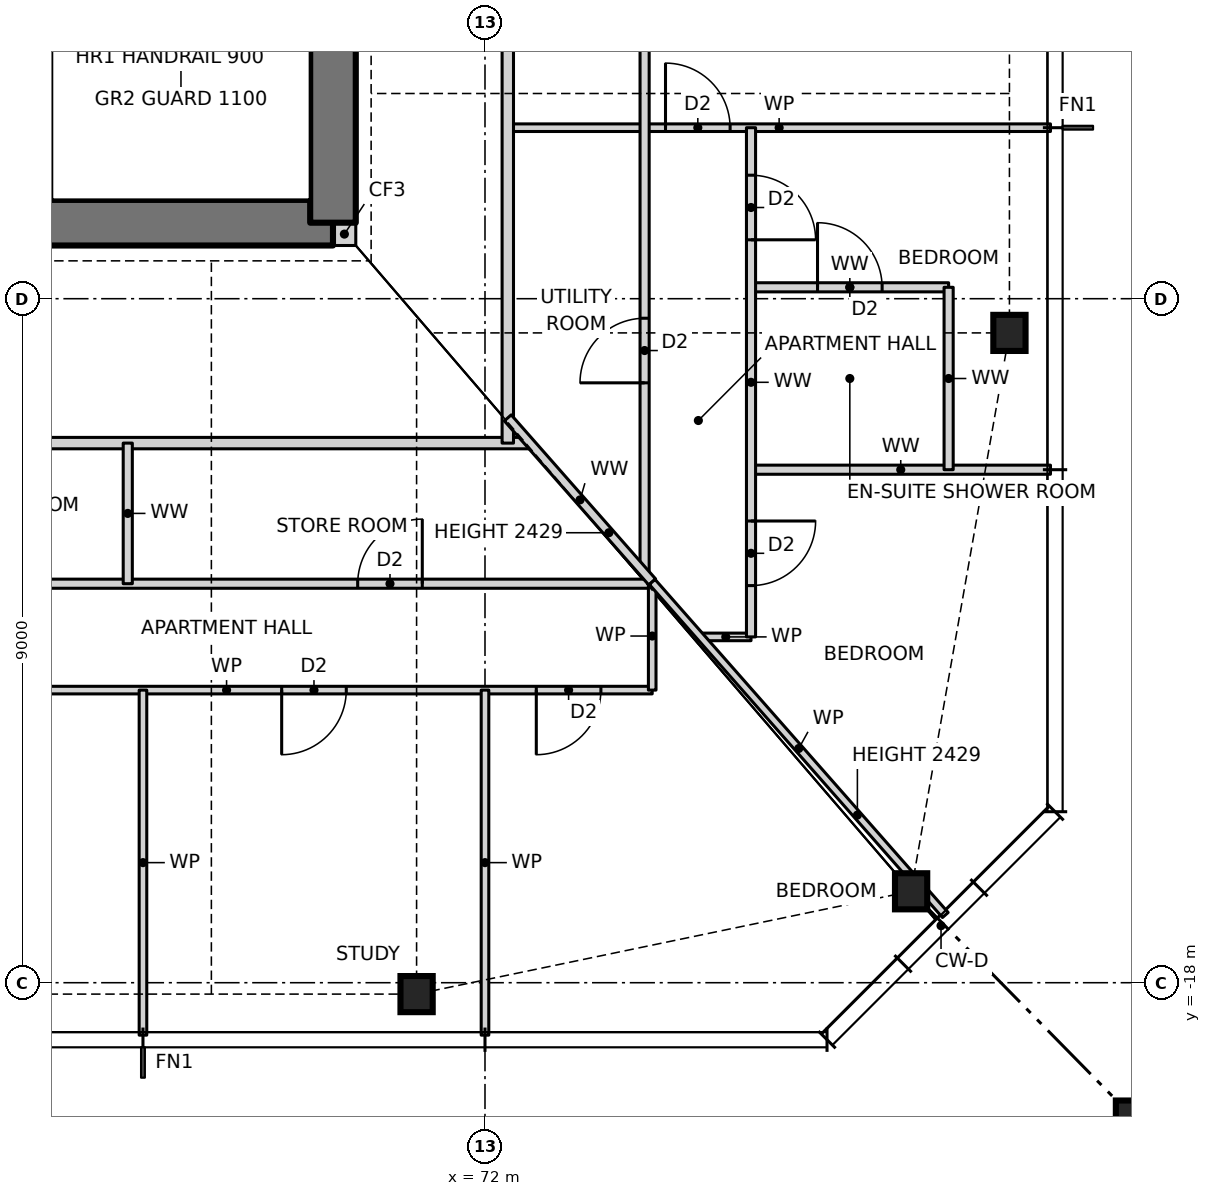
"""IFC4 building model, lengths in metres.
Left out: names, types, materials, properties, quantities, classifications, styles, units other than length and angle.
Written with IfcOpenShell. Run it as: python <this file> out.ifc"""

import sys

from ifc_helpers import new_model, si_unit, direction, frame, frame_2d, origin, origin_2d, place, context, subcontext, project, spatial, rectangle, hollow_rectangle, i_section, extrude, element, fill, save


model = new_model("IFC4")
c1 = context("Model", 3, precision=1e-05, world=origin(), true_north=direction((0.0, 1.0)))
c2 = subcontext(c1, "Body", "Model", "MODEL_VIEW")
j1 = project(units=[si_unit("LENGTHUNIT", "METRE"), si_unit("PLANEANGLEUNIT", "RADIAN")], contexts=[c1])
p1 = place(None, origin())
s1 = spatial("IfcSite", under=j1, at=p1, CompositionType="ELEMENT")
p2 = place(p1, origin())
s2 = spatial("IfcBuilding", under=s1, at=p2, CompositionType="ELEMENT")
p3 = place(p2, frame((0.0, 0.0, 18.5)))
s3 = spatial("IfcBuildingStorey", under=s2, at=p3, CompositionType="ELEMENT", Elevation=18.5)
for number, where, z_axis, x_axis in (
    (1, (71.1, -18.15, 0.0), (0.0, 0.0, 1.0), (1.0, 0.0, 0.0)),
    (2, (77.606, -16.797, 0.0), (0.0, 0.0, 1.0), (1.0, 0.0, 0.0)),
    (3, (78.9, -9.45, 0.0), (0.0, 0.0, 1.0), (1.0, 0.0, 0.0)),
):
    element("IfcColumn", number, at=place(p3, frame(where, z_axis=z_axis, x_axis=x_axis)), inside=s3, PredefinedType="COLUMN", context=c2, shape_type="SweptSolid", body=[
        extrude(i_section(OverallWidth=0.424, OverallDepth=0.475, WebThickness=0.048, FlangeThickness=0.077, at=origin_2d()), origin(), (0.0, 0.0, 1.0), 3.5),
    ])
p4 = place(p3, frame((80.9, -20.15, 0.0), z_axis=(0.0, 0.0, 1.0), x_axis=(1.0, 0.0, 0.0)))
e4 = element("IfcColumn", 4, at=p4, inside=s3, PredefinedType="COLUMN", context=c2, shape_type="SweptSolid", body=[
    extrude(hollow_rectangle(XDim=1.2, YDim=1.2, WallThickness=0.07, at=origin_2d()), origin(), (0.0, 0.0, 1.0), 3.5),
])
p5 = place(p3, frame((70.0, -8.15, 0.0), z_axis=(0.0, 0.0, 1.0), x_axis=(1.0, 0.0, 0.0)))
e5 = element("IfcWall", 5, at=p5, inside=s3, PredefinedType="SOLIDWALL", context=c2, shape_type="SweptSolid", body=[
    extrude(rectangle(XDim=0.3, YDim=0.3, at=frame_2d((0.15, 0.0))), origin(), (0.0, 0.0, 1.0), 3.5),
])
p6 = place(p3, frame((56.0, -8.0, 0.0), z_axis=(0.0, 0.0, 1.0), x_axis=(1.0, 0.0, 0.0)))
e6 = element("IfcWall", 6, at=p6, inside=s3, PredefinedType="SHEAR", context=c2, shape_type="SweptSolid", body=[
    extrude(rectangle(XDim=14.0, YDim=0.6, at=frame_2d((7.0, 0.0))), origin(), (0.0, 0.0, 1.0), 3.5),
])
p7 = place(p6, frame((2.7, 0.0, 0.0)))
e7 = element("IfcOpeningElement", 7, at=p7, cuts=e6, PredefinedType="OPENING", context=c2, shape_type="SweptSolid", body=[
    extrude(rectangle(XDim=0.9, YDim=2.1, at=frame_2d((0.45, 1.05))), frame((0.0, 0.31, 0.0), z_axis=(0.0, -1.0, 0.0), x_axis=(1.0, 0.0, 0.0)), (0.0, 0.0, 1.0), 0.62),
])
p8 = place(p6, frame((7.7, 0.0, 0.0)))
e8 = element("IfcOpeningElement", 8, at=p8, cuts=e6, PredefinedType="OPENING", context=c2, shape_type="SweptSolid", body=[
    extrude(rectangle(XDim=0.9, YDim=2.1, at=frame_2d((0.45, 1.05))), frame((0.0, 0.31, 0.0), z_axis=(0.0, -1.0, 0.0), x_axis=(1.0, 0.0, 0.0)), (0.0, 0.0, 1.0), 0.62),
])
p9 = place(p3, frame((70.0, -8.0, 0.0), z_axis=(0.0, 0.0, 1.0), x_axis=(0.0, 1.0, 0.0)))
e9 = element("IfcWall", 9, at=p9, inside=s3, PredefinedType="SHEAR", context=c2, shape_type="SweptSolid", body=[
    extrude(rectangle(XDim=16.0, YDim=0.6, at=frame_2d((8.0, 0.0))), origin(), (0.0, 0.0, 1.0), 3.5),
])
p10 = place(p9, frame((7.5, 0.0, 0.0)))
e10 = element("IfcOpeningElement", 10, at=p10, cuts=e9, PredefinedType="OPENING", context=c2, shape_type="SweptSolid", body=[
    extrude(rectangle(XDim=1.0, YDim=2.1, at=frame_2d((0.5, 1.05))), frame((0.0, 0.31, 0.0), z_axis=(0.0, -1.0, 0.0), x_axis=(1.0, 0.0, 0.0)), (0.0, 0.0, 1.0), 0.62),
])
p11 = place(p3, frame((63.0, -14.15, 0.0), z_axis=(0.0, 0.0, 1.0), x_axis=(1.0, 0.0, 0.0)))
e11 = element("IfcWall", 11, at=p11, inside=s3, PredefinedType="PARTITIONING", context=c2, shape_type="SweptSolid", body=[
    extrude(rectangle(XDim=11.2, YDim=0.1, at=frame_2d((5.6, 0.0))), origin(), (0.0, 0.0, 1.0), 3.27),
])
p12 = place(p11, frame((1.825, 0.0, 0.0)))
e12 = element("IfcOpeningElement", 12, at=p12, cuts=e11, PredefinedType="OPENING", context=c2, shape_type="SweptSolid", body=[
    extrude(rectangle(XDim=0.85, YDim=2.1, at=frame_2d((0.425, 1.05))), frame((0.0, 0.06, 0.0), z_axis=(0.0, -1.0, 0.0), x_axis=(1.0, 0.0, 0.0)), (0.0, 0.0, 1.0), 0.12),
])
p13 = place(p11, frame((6.325, 0.0, 0.0)))
e13 = element("IfcOpeningElement", 13, at=p13, cuts=e11, PredefinedType="OPENING", context=c2, shape_type="SweptSolid", body=[
    extrude(rectangle(XDim=0.85, YDim=2.1, at=frame_2d((0.425, 1.05))), frame((0.0, 0.06, 0.0), z_axis=(0.0, -1.0, 0.0), x_axis=(1.0, 0.0, 0.0)), (0.0, 0.0, 1.0), 0.12),
])
p14 = place(p11, frame((9.675, 0.0, 0.0)))
e14 = element("IfcOpeningElement", 14, at=p14, cuts=e11, PredefinedType="OPENING", context=c2, shape_type="SweptSolid", body=[
    extrude(rectangle(XDim=0.85, YDim=2.1, at=frame_2d((0.425, 1.05))), frame((0.0, 0.06, 0.0), z_axis=(0.0, -1.0, 0.0), x_axis=(1.0, 0.0, 0.0)), (0.0, 0.0, 1.0), 0.12),
])
p15 = place(p3, frame((74.836, -13.45, 0.0), z_axis=(0.0, 0.0, 1.0), x_axis=(1.0, 0.0, 0.0)))
e15 = element("IfcWall", 15, at=p15, inside=s3, PredefinedType="PARTITIONING", context=c2, shape_type="SweptSolid", body=[
    extrude(rectangle(XDim=0.664, YDim=0.1, at=frame_2d((0.332, 0.0))), origin(), (0.0, 0.0, 1.0), 3.27),
])
p16 = place(p3, frame((54.0, -12.75, 0.0), z_axis=(0.0, 0.0, 1.0), x_axis=(1.0, 0.0, 0.0)))
e16 = element("IfcWall", 16, at=p16, inside=s3, PredefinedType="PARTITIONING", context=c2, shape_type="SweptSolid", body=[
    extrude(rectangle(XDim=20.2, YDim=0.12, at=frame_2d((10.1, 0.0))), origin(), (0.0, 0.0, 1.0), 3.27),
])
p17 = place(p16, frame((1.375, 0.0, 0.0)))
e17 = element("IfcOpeningElement", 17, at=p17, cuts=e16, PredefinedType="OPENING", context=c2, shape_type="SweptSolid", body=[
    extrude(rectangle(XDim=0.85, YDim=2.1, at=frame_2d((0.425, 1.05))), frame((0.0, 0.07, 0.0), z_axis=(0.0, -1.0, 0.0), x_axis=(1.0, 0.0, 0.0)), (0.0, 0.0, 1.0), 0.14),
])
p18 = place(p16, frame((4.575, 0.0, 0.0)))
e18 = element("IfcOpeningElement", 18, at=p18, cuts=e16, PredefinedType="OPENING", context=c2, shape_type="SweptSolid", body=[
    extrude(rectangle(XDim=0.85, YDim=2.1, at=frame_2d((0.425, 1.05))), frame((0.0, 0.07, 0.0), z_axis=(0.0, -1.0, 0.0), x_axis=(1.0, 0.0, 0.0)), (0.0, 0.0, 1.0), 0.14),
])
p19 = place(p16, frame((10.725, 0.0, 0.0)))
e19 = element("IfcOpeningElement", 19, at=p19, cuts=e16, PredefinedType="OPENING", context=c2, shape_type="SweptSolid", body=[
    extrude(rectangle(XDim=0.85, YDim=2.1, at=frame_2d((0.425, 1.05))), frame((0.0, 0.07, 0.0), z_axis=(0.0, -1.0, 0.0), x_axis=(1.0, 0.0, 0.0)), (0.0, 0.0, 1.0), 0.14),
])
p20 = place(p16, frame((16.325, 0.0, 0.0)))
e20 = element("IfcOpeningElement", 20, at=p20, cuts=e16, PredefinedType="OPENING", context=c2, shape_type="SweptSolid", body=[
    extrude(rectangle(XDim=0.85, YDim=2.1, at=frame_2d((0.425, 1.05))), frame((0.0, 0.07, 0.0), z_axis=(0.0, -1.0, 0.0), x_axis=(1.0, 0.0, 0.0)), (0.0, 0.0, 1.0), 0.14),
])
p21 = place(p3, frame((75.5, -11.25, 0.0), z_axis=(0.0, 0.0, 1.0), x_axis=(1.0, 0.0, 0.0)))
e21 = element("IfcWall", 21, at=p21, inside=s3, PredefinedType="PARTITIONING", context=c2, shape_type="SweptSolid", body=[
    extrude(rectangle(XDim=3.94, YDim=0.12, at=frame_2d((1.97, 0.0))), origin(), (0.0, 0.0, 1.0), 3.27),
])
p22 = place(p3, frame((53.408, -10.9, 0.0), z_axis=(0.0, 0.0, 1.0), x_axis=(1.0, 0.0, 0.0)))
e22 = element("IfcWall", 22, at=p22, inside=s3, PredefinedType="PARTITIONING", context=c2, shape_type="SweptSolid", body=[
    extrude(rectangle(XDim=19.184, YDim=0.15, at=frame_2d((9.592, 0.0))), origin(), (0.0, 0.0, 1.0), 3.27),
])
p23 = place(p22, frame((5.092, 0.0, 0.0)))
e23 = element("IfcOpeningElement", 23, at=p23, cuts=e22, PredefinedType="OPENING", context=c2, shape_type="SweptSolid", body=[
    extrude(rectangle(XDim=1.0, YDim=2.1, at=frame_2d((0.5, 1.05))), frame((0.0, 0.085, 0.0), z_axis=(0.0, -1.0, 0.0), x_axis=(1.0, 0.0, 0.0)), (0.0, 0.0, 1.0), 0.17),
])
p24 = place(p3, frame((75.5, -8.85, 0.0), z_axis=(0.0, 0.0, 1.0), x_axis=(1.0, 0.0, 0.0)))
e24 = element("IfcWall", 24, at=p24, inside=s3, PredefinedType="PARTITIONING", context=c2, shape_type="SweptSolid", body=[
    extrude(rectangle(XDim=2.6, YDim=0.12, at=frame_2d((1.3, 0.0))), origin(), (0.0, 0.0, 1.0), 3.27),
])
p25 = place(p24, frame((0.875, 0.0, 0.0)))
e25 = element("IfcOpeningElement", 25, at=p25, cuts=e24, PredefinedType="OPENING", context=c2, shape_type="SweptSolid", body=[
    extrude(rectangle(XDim=0.85, YDim=2.1, at=frame_2d((0.425, 1.05))), frame((0.0, 0.07, 0.0), z_axis=(0.0, -1.0, 0.0), x_axis=(1.0, 0.0, 0.0)), (0.0, 0.0, 1.0), 0.14),
])
p26 = place(p3, frame((72.3, -6.75, 0.0), z_axis=(0.0, 0.0, 1.0), x_axis=(1.0, 0.0, 0.0)))
e26 = element("IfcWall", 26, at=p26, inside=s3, PredefinedType="PARTITIONING", context=c2, shape_type="SweptSolid", body=[
    extrude(rectangle(XDim=7.14, YDim=0.1, at=frame_2d((3.57, 0.0))), origin(), (0.0, 0.0, 1.0), 3.27),
])
p27 = place(p26, frame((2.075, 0.0, 0.0)))
e27 = element("IfcOpeningElement", 27, at=p27, cuts=e26, PredefinedType="OPENING", context=c2, shape_type="SweptSolid", body=[
    extrude(rectangle(XDim=0.85, YDim=2.1, at=frame_2d((0.425, 1.05))), frame((0.0, 0.06, 0.0), z_axis=(0.0, -1.0, 0.0), x_axis=(1.0, 0.0, 0.0)), (0.0, 0.0, 1.0), 0.12),
])
p28 = place(p3, frame((78.1, -11.25, 0.0), z_axis=(0.0, 0.0, 1.0), x_axis=(0.0, 1.0, 0.0)))
e28 = element("IfcWall", 28, at=p28, inside=s3, PredefinedType="PARTITIONING", context=c2, shape_type="SweptSolid", body=[
    extrude(rectangle(XDim=2.4, YDim=0.12, at=frame_2d((1.2, 0.0))), origin(), (0.0, 0.0, 1.0), 3.27),
])
p29 = place(p3, frame((75.5, -13.45, 0.0), z_axis=(0.0, 0.0, 1.0), x_axis=(0.0, 1.0, 0.0)))
e29 = element("IfcWall", 29, at=p29, inside=s3, PredefinedType="PARTITIONING", context=c2, shape_type="SweptSolid", body=[
    extrude(rectangle(XDim=6.7, YDim=0.12, at=frame_2d((3.35, 0.0))), origin(), (0.0, 0.0, 1.0), 3.27),
])
p30 = place(p29, frame((5.225, 0.0, 0.0)))
e30 = element("IfcOpeningElement", 30, at=p30, cuts=e29, PredefinedType="OPENING", context=c2, shape_type="SweptSolid", body=[
    extrude(rectangle(XDim=0.85, YDim=2.1, at=frame_2d((0.425, 1.05))), frame((0.0, 0.07, 0.0), z_axis=(0.0, -1.0, 0.0), x_axis=(1.0, 0.0, 0.0)), (0.0, 0.0, 1.0), 0.14),
])
p31 = place(p29, frame((0.675, 0.0, 0.0)))
e31 = element("IfcOpeningElement", 31, at=p31, cuts=e29, PredefinedType="OPENING", context=c2, shape_type="SweptSolid", body=[
    extrude(rectangle(XDim=0.85, YDim=2.1, at=frame_2d((0.425, 1.05))), frame((0.0, 0.07, 0.0), z_axis=(0.0, -1.0, 0.0), x_axis=(1.0, 0.0, 0.0)), (0.0, 0.0, 1.0), 0.14),
])
p32 = place(p3, frame((74.2, -14.15, 0.0), z_axis=(0.0, 0.0, 1.0), x_axis=(0.0, 1.0, 0.0)))
e32 = element("IfcWall", 32, at=p32, inside=s3, PredefinedType="PARTITIONING", context=c2, shape_type="SweptSolid", body=[
    extrude(rectangle(XDim=1.423, YDim=0.1, at=frame_2d((0.711, 0.0))), origin(), (0.0, 0.0, 1.0), 3.27),
])
p33 = place(p3, frame((74.1, -12.614, 0.0), z_axis=(0.0, 0.0, 1.0), x_axis=(0.0, 1.0, 0.0)))
e33 = element("IfcWall", 33, at=p33, inside=s3, PredefinedType="PARTITIONING", context=c2, shape_type="SweptSolid", body=[
    extrude(rectangle(XDim=25.228, YDim=0.12, at=frame_2d((12.614, 0.0))), origin(), (0.0, 0.0, 1.0), 3.27),
])
p34 = place(p33, frame((7.239, 0.0, 0.0)))
e34 = element("IfcOpeningElement", 34, at=p34, cuts=e33, PredefinedType="OPENING", context=c2, shape_type="SweptSolid", body=[
    extrude(rectangle(XDim=0.85, YDim=2.1, at=frame_2d((0.425, 1.05))), frame((0.0, 0.07, 0.0), z_axis=(0.0, -1.0, 0.0), x_axis=(1.0, 0.0, 0.0)), (0.0, 0.0, 1.0), 0.14),
])
p35 = place(p33, frame((10.439, 0.0, 0.0)))
e35 = element("IfcOpeningElement", 35, at=p35, cuts=e33, PredefinedType="OPENING", context=c2, shape_type="SweptSolid", body=[
    extrude(rectangle(XDim=0.85, YDim=2.1, at=frame_2d((0.425, 1.05))), frame((0.0, 0.07, 0.0), z_axis=(0.0, -1.0, 0.0), x_axis=(1.0, 0.0, 0.0)), (0.0, 0.0, 1.0), 0.14),
])
p36 = place(p33, frame((2.507, 0.0, 0.0)))
e36 = element("IfcOpeningElement", 36, at=p36, cuts=e33, PredefinedType="OPENING", context=c2, shape_type="SweptSolid", body=[
    extrude(rectangle(XDim=0.85, YDim=2.1, at=frame_2d((0.425, 1.05))), frame((0.0, 0.07, 0.0), z_axis=(0.0, -1.0, 0.0), x_axis=(1.0, 0.0, 0.0)), (0.0, 0.0, 1.0), 0.14),
])
p37 = place(p33, frame((16.639, 0.0, 0.0)))
e37 = element("IfcOpeningElement", 37, at=p37, cuts=e33, PredefinedType="OPENING", context=c2, shape_type="SweptSolid", body=[
    extrude(rectangle(XDim=0.85, YDim=2.1, at=frame_2d((0.425, 1.05))), frame((0.0, 0.07, 0.0), z_axis=(0.0, -1.0, 0.0), x_axis=(1.0, 0.0, 0.0)), (0.0, 0.0, 1.0), 0.14),
])
p38 = place(p33, frame((21.821, 0.0, 0.0)))
e38 = element("IfcOpeningElement", 38, at=p38, cuts=e33, PredefinedType="OPENING", context=c2, shape_type="SweptSolid", body=[
    extrude(rectangle(XDim=0.85, YDim=2.1, at=frame_2d((0.425, 1.05))), frame((0.0, 0.07, 0.0), z_axis=(0.0, -1.0, 0.0), x_axis=(1.0, 0.0, 0.0)), (0.0, 0.0, 1.0), 0.14),
])
p39 = place(p3, frame((72.3, -10.9, 0.0), z_axis=(0.0, 0.0, 1.0), x_axis=(0.0, 1.0, 0.0)))
e39 = element("IfcWall", 39, at=p39, inside=s3, PredefinedType="PARTITIONING", context=c2, shape_type="SweptSolid", body=[
    extrude(rectangle(XDim=21.468, YDim=0.15, at=frame_2d((10.734, 0.0))), origin(), (0.0, 0.0, 1.0), 3.27),
])
p40 = place(p39, frame((8.65, 0.0, 0.0)))
e40 = element("IfcOpeningElement", 40, at=p40, cuts=e39, PredefinedType="OPENING", context=c2, shape_type="SweptSolid", body=[
    extrude(rectangle(XDim=1.0, YDim=2.1, at=frame_2d((0.5, 1.05))), frame((0.0, 0.085, 0.0), z_axis=(0.0, -1.0, 0.0), x_axis=(1.0, 0.0, 0.0)), (0.0, 0.0, 1.0), 0.17),
])
for number, where, z_axis, x_axis in (
    (41, (72.0, -18.69, 0.0), (0.0, 0.0, 1.0), (0.0, 1.0, 0.0)),
    (42, (67.5, -18.69, 0.0), (0.0, 0.0, 1.0), (0.0, 1.0, 0.0)),
):
    element("IfcWall", number, at=place(p3, frame(where, z_axis=z_axis, x_axis=x_axis)), inside=s3, PredefinedType="PARTITIONING", context=c2, shape_type="SweptSolid", body=[
        extrude(rectangle(XDim=4.54, YDim=0.1, at=frame_2d((2.27, 0.0))), origin(), (0.0, 0.0, 1.0), 3.27),
    ])
p41 = place(p3, frame((67.3, -12.75, 0.0), z_axis=(0.0, 0.0, 1.0), x_axis=(0.0, 1.0, 0.0)))
e43 = element("IfcWall", 43, at=p41, inside=s3, PredefinedType="PARTITIONING", context=c2, shape_type="SweptSolid", body=[
    extrude(rectangle(XDim=1.85, YDim=0.12, at=frame_2d((0.925, 0.0))), origin(), (0.0, 0.0, 1.0), 3.27),
])
p42 = place(p3, frame((66.3, -7.64, 0.0), z_axis=(0.0, 0.0, 1.0), x_axis=(0.0, 1.0, 0.0)))
e44 = element("IfcWall", 44, at=p42, inside=s3, PredefinedType="SOLIDWALL", context=c2, shape_type="SweptSolid", body=[
    extrude(rectangle(XDim=11.49, YDim=0.2, at=frame_2d((5.745, 0.0))), origin(), (0.0, 0.0, 1.0), 3.5),
])
p43 = place(p42, frame((7.04, 0.0, 0.0)))
e45 = element("IfcOpeningElement", 45, at=p43, cuts=e44, PredefinedType="OPENING", context=c2, shape_type="SweptSolid", body=[
    extrude(rectangle(XDim=1.2, YDim=2.1, at=frame_2d((0.6, 1.05))), frame((0.0, 0.11, 0.0), z_axis=(0.0, -1.0, 0.0), x_axis=(1.0, 0.0, 0.0)), (0.0, 0.0, 1.0), 0.22),
])
p44 = place(p3, frame((74.2, -12.727, 0.0), z_axis=(0.0, 0.0, 1.0), x_axis=(-0.66059344937, 0.75074382758, 0.0)))
e46 = element("IfcWall", 46, at=p44, inside=s3, PredefinedType="PARTITIONING", context=c2, shape_type="SweptSolid", body=[
    extrude(rectangle(XDim=2.876, YDim=0.12, at=frame_2d((1.438, 0.0))), origin(), (0.0, 0.0, 1.0), 2.429),
])
p45 = place(p3, frame((78.057, -17.109, 0.0), z_axis=(0.0, 0.0, 1.0), x_axis=(-0.660654290516, 0.750690287951, 0.0)))
e47 = element("IfcWall", 47, at=p45, inside=s3, PredefinedType="PARTITIONING", context=c2, shape_type="SweptSolid", body=[
    extrude(rectangle(XDim=5.838, YDim=0.1, at=frame_2d((2.919, 0.0))), origin(), (0.0, 0.0, 1.0), 2.429),
])
p46 = place(p13, frame((0.85, 0.0, 0.0), z_axis=(0.0, 0.0, 1.0), x_axis=(-1.0, 0.0, 0.0)))
e48 = element("IfcDoor", 48, at=p46, inside=s3, OperationType="SINGLE_SWING_RIGHT", PredefinedType="DOOR", context=c2, shape_type="SweptSolid", body=[
    extrude(rectangle(XDim=0.85, YDim=2.1, at=frame_2d((0.425, 1.05))), frame((0.0, 0.025, 0.0), z_axis=(0.0, -1.0, 0.0), x_axis=(1.0, 0.0, 0.0)), (0.0, 0.0, 1.0), 0.05),
])
fill(e13, e48)
p47 = place(p14, frame((0.85, 0.0, 0.0), z_axis=(0.0, 0.0, 1.0), x_axis=(-1.0, 0.0, 0.0)))
e49 = element("IfcDoor", 49, at=p47, inside=s3, OperationType="SINGLE_SWING_RIGHT", PredefinedType="DOOR", context=c2, shape_type="SweptSolid", body=[
    extrude(rectangle(XDim=0.85, YDim=2.1, at=frame_2d((0.425, 1.05))), frame((0.0, 0.025, 0.0), z_axis=(0.0, -1.0, 0.0), x_axis=(1.0, 0.0, 0.0)), (0.0, 0.0, 1.0), 0.05),
])
fill(e14, e49)
p48 = place(p20, origin())
e50 = element("IfcDoor", 50, at=p48, inside=s3, OperationType="SINGLE_SWING_RIGHT", PredefinedType="DOOR", context=c2, shape_type="SweptSolid", body=[
    extrude(rectangle(XDim=0.85, YDim=2.1, at=frame_2d((0.425, 1.05))), frame((0.0, 0.025, 0.0), z_axis=(0.0, -1.0, 0.0), x_axis=(1.0, 0.0, 0.0)), (0.0, 0.0, 1.0), 0.05),
])
fill(e20, e50)
p49 = place(p27, origin())
e51 = element("IfcDoor", 51, at=p49, inside=s3, OperationType="SINGLE_SWING_LEFT", PredefinedType="DOOR", context=c2, shape_type="SweptSolid", body=[
    extrude(rectangle(XDim=0.85, YDim=2.1, at=frame_2d((0.425, 1.05))), frame((0.0, 0.025, 0.0), z_axis=(0.0, -1.0, 0.0), x_axis=(1.0, 0.0, 0.0)), (0.0, 0.0, 1.0), 0.05),
])
fill(e27, e51)
p50 = place(p25, origin())
e52 = element("IfcDoor", 52, at=p50, inside=s3, OperationType="SINGLE_SWING_LEFT", PredefinedType="DOOR", context=c2, shape_type="SweptSolid", body=[
    extrude(rectangle(XDim=0.85, YDim=2.1, at=frame_2d((0.425, 1.05))), frame((0.0, 0.025, 0.0), z_axis=(0.0, -1.0, 0.0), x_axis=(1.0, 0.0, 0.0)), (0.0, 0.0, 1.0), 0.05),
])
fill(e25, e52)
p51 = place(p30, frame((0.85, 0.0, 0.0), z_axis=(0.0, 0.0, 1.0), x_axis=(-1.0, 0.0, 0.0)))
e53 = element("IfcDoor", 53, at=p51, inside=s3, OperationType="SINGLE_SWING_RIGHT", PredefinedType="DOOR", context=c2, shape_type="SweptSolid", body=[
    extrude(rectangle(XDim=0.85, YDim=2.1, at=frame_2d((0.425, 1.05))), frame((0.0, 0.025, 0.0), z_axis=(0.0, -1.0, 0.0), x_axis=(1.0, 0.0, 0.0)), (0.0, 0.0, 1.0), 0.05),
])
fill(e30, e53)
p52 = place(p31, frame((0.85, 0.0, 0.0), z_axis=(0.0, 0.0, 1.0), x_axis=(-1.0, 0.0, 0.0)))
e54 = element("IfcDoor", 54, at=p52, inside=s3, OperationType="SINGLE_SWING_LEFT", PredefinedType="DOOR", context=c2, shape_type="SweptSolid", body=[
    extrude(rectangle(XDim=0.85, YDim=2.1, at=frame_2d((0.425, 1.05))), frame((0.0, 0.025, 0.0), z_axis=(0.0, -1.0, 0.0), x_axis=(1.0, 0.0, 0.0)), (0.0, 0.0, 1.0), 0.05),
])
fill(e31, e54)
p53 = place(p36, origin())
e55 = element("IfcDoor", 55, at=p53, inside=s3, OperationType="SINGLE_SWING_LEFT", PredefinedType="DOOR", context=c2, shape_type="SweptSolid", body=[
    extrude(rectangle(XDim=0.85, YDim=2.1, at=frame_2d((0.425, 1.05))), frame((0.0, 0.025, 0.0), z_axis=(0.0, -1.0, 0.0), x_axis=(1.0, 0.0, 0.0)), (0.0, 0.0, 1.0), 0.05),
])
fill(e36, e55)
save(model, sys.argv[1])
